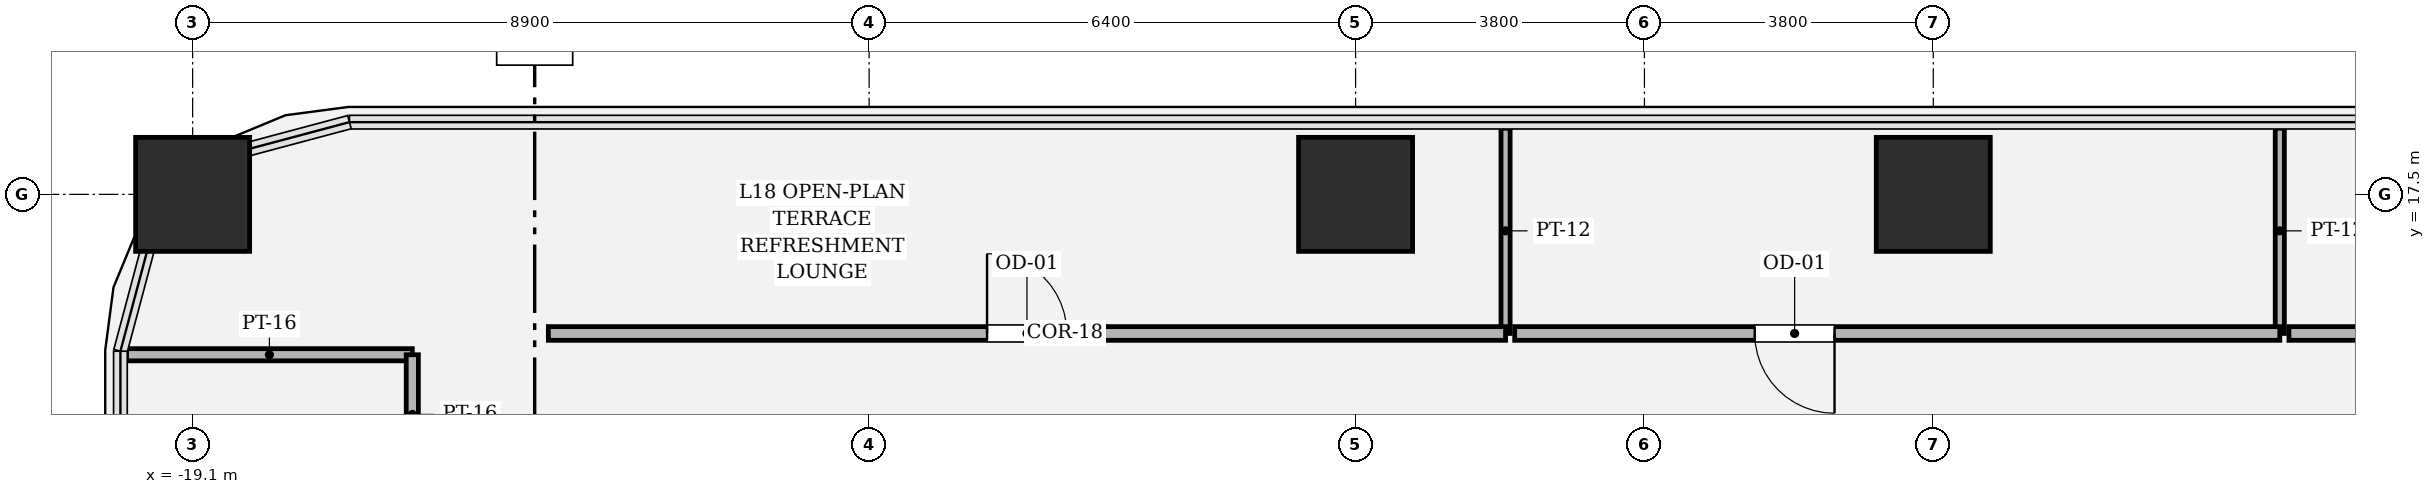
"""IFC4 building model, lengths in metres.
Left out: names, types, materials, properties, quantities, classifications, styles, units other than length and angle.
Written with IfcOpenShell. Run it as: python <this file> out.ifc"""

import sys

from ifc_helpers import new_model, si_unit, direction, frame, frame_2d, origin, origin_2d, place, context, subcontext, project, spatial, rectangle, hollow_rectangle, extrude, element, fill, save


model = new_model("IFC4")
c1 = context("Model", 3, precision=1e-05, world=origin(), true_north=direction((0.0, 1.0)))
c2 = subcontext(c1, "Body", "Model", "MODEL_VIEW")
j1 = project(units=[si_unit("LENGTHUNIT", "METRE"), si_unit("PLANEANGLEUNIT", "RADIAN")], contexts=[c1])
p1 = place(None, origin())
s1 = spatial("IfcSite", under=j1, at=p1, CompositionType="ELEMENT")
p2 = place(p1, origin())
s2 = spatial("IfcBuilding", under=s1, at=p2, CompositionType="ELEMENT")
p3 = place(p2, frame((0.0, 0.0, 80.85)))
s3 = spatial("IfcBuildingStorey", under=s2, at=p3, CompositionType="ELEMENT", Elevation=80.85)
for number, where, z_axis, x_axis in (
    (1, (3.8, 17.5, 0.0), (0.0, 0.0, 1.0), (1.0, 0.0, 0.0)),
    (2, (-3.8, 17.5, 0.0), (0.0, 0.0, 1.0), (1.0, 0.0, 0.0)),
    (3, (-19.1, 17.5, 0.0), (0.0, 0.0, 1.0), (1.0, 0.0, 0.0)),
):
    element("IfcColumn", number, at=place(p3, frame(where, z_axis=z_axis, x_axis=x_axis)), inside=s3, PredefinedType="COLUMN", context=c2, shape_type="SweptSolid", body=[
        extrude(hollow_rectangle(XDim=1.5, YDim=1.5, WallThickness=0.045, at=origin_2d()), origin(), (0.0, 0.0, 1.0), 4.05),
    ])
p4 = place(p3, frame((-19.97, 15.39, 0.0), z_axis=(0.0, 0.0, 1.0), x_axis=(1.0, 0.0, 0.0)))
e4 = element("IfcWall", 4, at=p4, inside=s3, PredefinedType="PARTITIONING", context=c2, shape_type="SweptSolid", body=[
    extrude(rectangle(XDim=3.76, YDim=0.16, at=frame_2d((1.88, 0.0))), origin(), (0.0, 0.0, 1.0), 3.104),
])
p5 = place(p3, frame((-16.21, 15.39, 0.0), z_axis=(0.0, 0.0, 1.0), x_axis=(0.0, -1.0, 0.0)))
e5 = element("IfcWall", 5, at=p5, inside=s3, PredefinedType="PARTITIONING", context=c2, shape_type="SweptSolid", body=[
    extrude(rectangle(XDim=1.57, YDim=0.16, at=frame_2d((0.785, 0.0))), origin(), (0.0, 0.0, 1.0), 3.81),
])
p6 = place(p3, frame((-1.827, 18.37, 0.0), z_axis=(0.0, 0.0, 1.0), x_axis=(0.0, -1.0, 0.0)))
e6 = element("IfcWall", 6, at=p6, inside=s3, PredefinedType="PARTITIONING", context=c2, shape_type="SweptSolid", body=[
    extrude(rectangle(XDim=2.7, YDim=0.12, at=frame_2d((1.35, 0.0))), origin(), (0.0, 0.0, 1.0), 3.104),
])
p7 = place(p3, frame((-1.827, 15.67, 0.0), z_axis=(0.0, 0.0, 1.0), x_axis=(-1.0, 0.0, 0.0)))
e7 = element("IfcWall", 7, at=p7, inside=s3, PredefinedType="PARTITIONING", context=c2, shape_type="SweptSolid", body=[
    extrude(rectangle(XDim=12.593, YDim=0.18, at=frame_2d((6.296, 0.0))), origin(), (0.0, 0.0, 1.0), 3.104),
])
p8 = place(p7, frame((5.771, 0.0, 0.0)))
e8 = element("IfcOpeningElement", 8, at=p8, cuts=e7, PredefinedType="OPENING", context=c2, shape_type="SweptSolid", body=[
    extrude(rectangle(XDim=1.05, YDim=2.2, at=frame_2d((0.525, 1.1))), frame((0.0, 0.1, 0.0), z_axis=(0.0, -1.0, 0.0), x_axis=(1.0, 0.0, 0.0)), (0.0, 0.0, 1.0), 0.2),
])
p9 = place(p3, frame((8.359, 18.37, 0.0), z_axis=(0.0, 0.0, 1.0), x_axis=(0.0, -1.0, 0.0)))
e9 = element("IfcWall", 9, at=p9, inside=s3, PredefinedType="PARTITIONING", context=c2, shape_type="SweptSolid", body=[
    extrude(rectangle(XDim=2.7, YDim=0.12, at=frame_2d((1.35, 0.0))), origin(), (0.0, 0.0, 1.0), 3.104),
])
p10 = place(p3, frame((8.359, 15.67, 0.0), z_axis=(0.0, 0.0, 1.0), x_axis=(-1.0, 0.0, 0.0)))
e10 = element("IfcWall", 10, at=p10, inside=s3, PredefinedType="PARTITIONING", context=c2, shape_type="SweptSolid", body=[
    extrude(rectangle(XDim=10.066, YDim=0.18, at=frame_2d((5.033, 0.0))), origin(), (0.0, 0.0, 1.0), 3.104),
])
p11 = place(p10, frame((5.858, 0.0, 0.0)))
e11 = element("IfcOpeningElement", 11, at=p11, cuts=e10, PredefinedType="OPENING", context=c2, shape_type="SweptSolid", body=[
    extrude(rectangle(XDim=1.05, YDim=2.2, at=frame_2d((0.525, 1.1))), frame((0.0, 0.1, 0.0), z_axis=(0.0, -1.0, 0.0), x_axis=(1.0, 0.0, 0.0)), (0.0, 0.0, 1.0), 0.2),
])
p12 = place(p3, frame((12.77, 15.67, 0.0), z_axis=(0.0, 0.0, 1.0), x_axis=(-1.0, 0.0, 0.0)))
e12 = element("IfcWall", 12, at=p12, inside=s3, PredefinedType="PARTITIONING", context=c2, shape_type="SweptSolid", body=[
    extrude(rectangle(XDim=4.291, YDim=0.18, at=frame_2d((2.146, 0.0))), origin(), (0.0, 0.0, 1.0), 3.104),
])
p13 = place(p12, frame((1.621, 0.0, 0.0)))
e13 = element("IfcOpeningElement", 13, at=p13, cuts=e12, PredefinedType="OPENING", context=c2, shape_type="SweptSolid", body=[
    extrude(rectangle(XDim=1.05, YDim=2.2, at=frame_2d((0.525, 1.1))), frame((0.0, 0.1, 0.0), z_axis=(0.0, -1.0, 0.0), x_axis=(1.0, 0.0, 0.0)), (0.0, 0.0, 1.0), 0.2),
])
p14 = place(p8, origin())
e14 = element("IfcDoor", 14, at=p14, inside=s3, OperationType="SINGLE_SWING_RIGHT", PredefinedType="DOOR", context=c2, shape_type="SweptSolid", body=[
    extrude(rectangle(XDim=1.05, YDim=2.2, at=frame_2d((0.525, 1.1))), frame((0.0, 0.025, 0.0), z_axis=(0.0, -1.0, 0.0), x_axis=(1.0, 0.0, 0.0)), (0.0, 0.0, 1.0), 0.05),
])
fill(e8, e14)
p15 = place(p11, origin())
e15 = element("IfcDoor", 15, at=p15, inside=s3, OperationType="SINGLE_SWING_LEFT", PredefinedType="DOOR", context=c2, shape_type="SweptSolid", body=[
    extrude(rectangle(XDim=1.05, YDim=2.2, at=frame_2d((0.525, 1.1))), frame((0.0, 0.025, 0.0), z_axis=(0.0, -1.0, 0.0), x_axis=(1.0, 0.0, 0.0)), (0.0, 0.0, 1.0), 0.05),
])
fill(e11, e15)
save(model, sys.argv[1])
